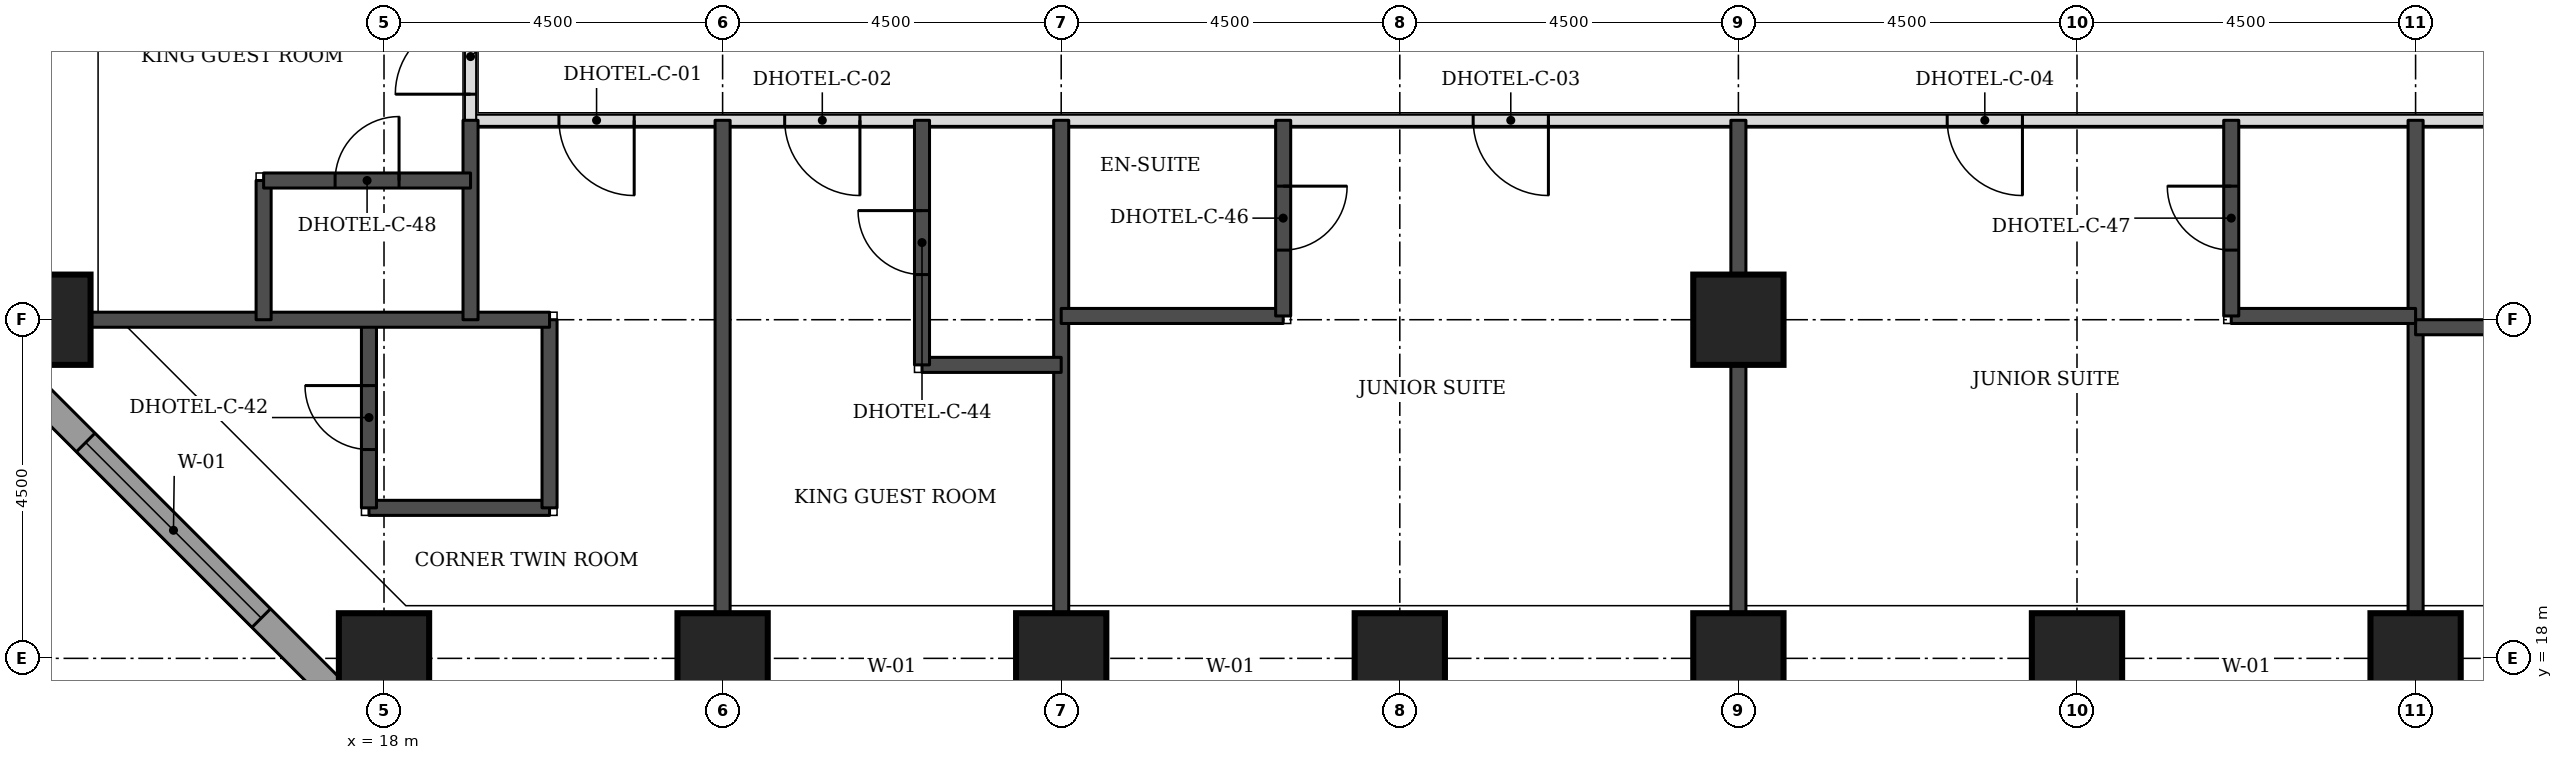
"""IFC4 building model, lengths in metres.
Left out: names, types, materials, properties, quantities, classifications, styles, units other than length and angle.
Written with IfcOpenShell. Run it as: python <this file> out.ifc"""

import sys

from ifc_helpers import new_model, si_unit, direction, frame, frame_2d, origin, origin_2d, place, context, subcontext, project, spatial, rectangle, extrude, element, fill, save


model = new_model("IFC4")
c1 = context("Model", 3, precision=1e-05, world=origin(), true_north=direction((0.0, 1.0)))
c2 = subcontext(c1, "Body", "Model", "MODEL_VIEW")
j1 = project(units=[si_unit("LENGTHUNIT", "METRE"), si_unit("PLANEANGLEUNIT", "RADIAN")], contexts=[c1])
p1 = place(None, origin())
s1 = spatial("IfcSite", under=j1, at=p1, CompositionType="ELEMENT")
p2 = place(p1, origin())
s2 = spatial("IfcBuilding", under=s1, at=p2, CompositionType="ELEMENT")
p3 = place(p2, frame((0.0, 0.0, 33.0)))
s3 = spatial("IfcBuildingStorey", under=s2, at=p3, CompositionType="ELEMENT", Elevation=33.0)
for number, where, z_axis, x_axis in (
    (1, (18.0, 18.0, 0.0), (0.0, 0.0, 1.0), (1.0, 0.0, 0.0)),
    (2, (22.5, 18.0, 0.0), (0.0, 0.0, 1.0), (1.0, 0.0, 0.0)),
    (3, (27.0, 18.0, 0.0), (0.0, 0.0, 1.0), (1.0, 0.0, 0.0)),
    (4, (31.5, 18.0, 0.0), (0.0, 0.0, 1.0), (1.0, 0.0, 0.0)),
    (5, (36.0, 18.0, 0.0), (0.0, 0.0, 1.0), (1.0, 0.0, 0.0)),
    (6, (40.5, 18.0, 0.0), (0.0, 0.0, 1.0), (1.0, 0.0, 0.0)),
    (7, (45.0, 18.0, 0.0), (0.0, 0.0, 1.0), (1.0, 0.0, 0.0)),
    (8, (13.5, 22.5, 0.0), (0.0, 0.0, 1.0), (1.0, 0.0, 0.0)),
    (9, (36.0, 22.5, 0.0), (0.0, 0.0, 1.0), (1.0, 0.0, 0.0)),
):
    element("IfcColumn", number, at=place(p3, frame(where, z_axis=z_axis, x_axis=x_axis)), inside=s3, PredefinedType="COLUMN", context=c2, shape_type="SweptSolid", body=[
        extrude(rectangle(XDim=1.2, YDim=1.2, at=origin_2d()), origin(), (0.0, 0.0, 1.0), 3.3),
    ])
p4 = place(p3, frame((12.674, 22.23, 0.0), z_axis=(0.0, 0.0, 1.0), x_axis=(0.707106781187, -0.707106781187, 0.0)))
e10 = element("IfcWall", 10, at=p4, inside=s3, PredefinedType="STANDARD", context=c2, shape_type="SweptSolid", body=[
    extrude(rectangle(XDim=7.151, YDim=0.35, at=frame_2d((3.576, 0.0))), origin(), (0.0, 0.0, 1.0), 3.055),
])
p5 = place(p4, frame((1.926, 0.0, 0.8)))
e11 = element("IfcOpeningElement", 11, at=p5, cuts=e10, PredefinedType="OPENING", context=c2, shape_type="SweptSolid", body=[
    extrude(rectangle(XDim=3.3, YDim=1.5, at=frame_2d((1.65, 0.75))), frame((0.0, 0.185, 0.0), z_axis=(0.0, -1.0, 0.0), x_axis=(1.0, 0.0, 0.0)), (0.0, 0.0, 1.0), 0.37),
])
p6 = place(p3, frame((19.15, 25.15, 0.0), z_axis=(0.0, 0.0, 1.0), x_axis=(1.0, 0.0, 0.0)))
e12 = element("IfcWall", 12, at=p6, inside=s3, PredefinedType="PARTITIONING", context=c2, shape_type="SweptSolid", body=[
    extrude(rectangle(XDim=33.7, YDim=0.15, at=frame_2d((16.85, 0.0))), origin(), (0.0, 0.0, 1.0), 3.08),
])
p7 = place(p6, frame((4.175, 0.0, 0.0)))
e13 = element("IfcOpeningElement", 13, at=p7, cuts=e12, PredefinedType="OPENING", context=c2, shape_type="SweptSolid", body=[
    extrude(rectangle(XDim=1.0, YDim=2.1, at=frame_2d((0.5, 1.05))), frame((0.0, 0.085, 0.0), z_axis=(0.0, -1.0, 0.0), x_axis=(1.0, 0.0, 0.0)), (0.0, 0.0, 1.0), 0.17),
])
p8 = place(p6, frame((13.325, 0.0, 0.0)))
e14 = element("IfcOpeningElement", 14, at=p8, cuts=e12, PredefinedType="OPENING", context=c2, shape_type="SweptSolid", body=[
    extrude(rectangle(XDim=1.0, YDim=2.1, at=frame_2d((0.5, 1.05))), frame((0.0, 0.085, 0.0), z_axis=(0.0, -1.0, 0.0), x_axis=(1.0, 0.0, 0.0)), (0.0, 0.0, 1.0), 0.17),
])
p9 = place(p6, frame((19.625, 0.0, 0.0)))
e15 = element("IfcOpeningElement", 15, at=p9, cuts=e12, PredefinedType="OPENING", context=c2, shape_type="SweptSolid", body=[
    extrude(rectangle(XDim=1.0, YDim=2.1, at=frame_2d((0.5, 1.05))), frame((0.0, 0.085, 0.0), z_axis=(0.0, -1.0, 0.0), x_axis=(1.0, 0.0, 0.0)), (0.0, 0.0, 1.0), 0.17),
])
p10 = place(p6, frame((28.775, 0.0, 0.0)))
e16 = element("IfcOpeningElement", 16, at=p10, cuts=e12, PredefinedType="OPENING", context=c2, shape_type="SweptSolid", body=[
    extrude(rectangle(XDim=1.0, YDim=2.1, at=frame_2d((0.5, 1.05))), frame((0.0, 0.085, 0.0), z_axis=(0.0, -1.0, 0.0), x_axis=(1.0, 0.0, 0.0)), (0.0, 0.0, 1.0), 0.17),
])
p11 = place(p6, frame((1.175, 0.0, 0.0)))
e17 = element("IfcOpeningElement", 17, at=p11, cuts=e12, PredefinedType="OPENING", context=c2, shape_type="SweptSolid", body=[
    extrude(rectangle(XDim=1.0, YDim=2.1, at=frame_2d((0.5, 1.05))), frame((0.0, 0.085, 0.0), z_axis=(0.0, -1.0, 0.0), x_axis=(1.0, 0.0, 0.0)), (0.0, 0.0, 1.0), 0.17),
])
p12 = place(p6, frame((31.525, 0.0, 0.0)))
e18 = element("IfcOpeningElement", 18, at=p12, cuts=e12, PredefinedType="OPENING", context=c2, shape_type="SweptSolid", body=[
    extrude(rectangle(XDim=1.0, YDim=2.1, at=frame_2d((0.5, 1.05))), frame((0.0, 0.085, 0.0), z_axis=(0.0, -1.0, 0.0), x_axis=(1.0, 0.0, 0.0)), (0.0, 0.0, 1.0), 0.17),
])
p13 = place(p3, frame((19.15, 25.15, 0.0), z_axis=(0.0, 0.0, 1.0), x_axis=(0.0, 1.0, 0.0)))
e19 = element("IfcWall", 19, at=p13, inside=s3, PredefinedType="PARTITIONING", context=c2, shape_type="SweptSolid", body=[
    extrude(rectangle(XDim=24.35, YDim=0.15, at=frame_2d((12.175, 0.0))), origin(), (0.0, 0.0, 1.0), 3.08),
])
p14 = place(p13, frame((0.347, 0.0, 0.0)))
e20 = element("IfcOpeningElement", 20, at=p14, cuts=e19, PredefinedType="OPENING", context=c2, shape_type="SweptSolid", body=[
    extrude(rectangle(XDim=1.0, YDim=2.1, at=frame_2d((0.5, 1.05))), frame((0.0, 0.085, 0.0), z_axis=(0.0, -1.0, 0.0), x_axis=(1.0, 0.0, 0.0)), (0.0, 0.0, 1.0), 0.17),
])
p15 = place(p13, frame((4.775, 0.0, 0.0)))
e21 = element("IfcOpeningElement", 21, at=p15, cuts=e19, PredefinedType="OPENING", context=c2, shape_type="SweptSolid", body=[
    extrude(rectangle(XDim=1.0, YDim=2.1, at=frame_2d((0.5, 1.05))), frame((0.0, 0.085, 0.0), z_axis=(0.0, -1.0, 0.0), x_axis=(1.0, 0.0, 0.0)), (0.0, 0.0, 1.0), 0.17),
])
p16 = place(p13, frame((7.175, 0.0, 0.0)))
e22 = element("IfcOpeningElement", 22, at=p16, cuts=e19, PredefinedType="OPENING", context=c2, shape_type="SweptSolid", body=[
    extrude(rectangle(XDim=1.0, YDim=2.1, at=frame_2d((0.5, 1.05))), frame((0.0, 0.085, 0.0), z_axis=(0.0, -1.0, 0.0), x_axis=(1.0, 0.0, 0.0)), (0.0, 0.0, 1.0), 0.17),
])
p17 = place(p13, frame((13.75, 0.0, 0.0)))
e23 = element("IfcOpeningElement", 23, at=p17, cuts=e19, PredefinedType="OPENING", context=c2, shape_type="SweptSolid", body=[
    extrude(rectangle(XDim=1.0, YDim=2.1, at=frame_2d((0.5, 1.05))), frame((0.0, 0.085, 0.0), z_axis=(0.0, -1.0, 0.0), x_axis=(1.0, 0.0, 0.0)), (0.0, 0.0, 1.0), 0.17),
])
p18 = place(p13, frame((16.175, 0.0, 0.0)))
e24 = element("IfcOpeningElement", 24, at=p18, cuts=e19, PredefinedType="OPENING", context=c2, shape_type="SweptSolid", body=[
    extrude(rectangle(XDim=1.0, YDim=2.1, at=frame_2d((0.5, 1.05))), frame((0.0, 0.085, 0.0), z_axis=(0.0, -1.0, 0.0), x_axis=(1.0, 0.0, 0.0)), (0.0, 0.0, 1.0), 0.17),
])
p19 = place(p13, frame((22.775, 0.0, 0.0)))
e25 = element("IfcOpeningElement", 25, at=p19, cuts=e19, PredefinedType="OPENING", context=c2, shape_type="SweptSolid", body=[
    extrude(rectangle(XDim=1.0, YDim=2.1, at=frame_2d((0.5, 1.05))), frame((0.0, 0.085, 0.0), z_axis=(0.0, -1.0, 0.0), x_axis=(1.0, 0.0, 0.0)), (0.0, 0.0, 1.0), 0.17),
])
for number, where, z_axis, x_axis in (
    (26, (22.5, 18.6, 0.0), (0.0, 0.0, 1.0), (0.0, 1.0, 0.0)),
    (27, (27.0, 18.6, 0.0), (0.0, 0.0, 1.0), (0.0, 1.0, 0.0)),
    (28, (36.0, 18.6, 0.0), (0.0, 0.0, 1.0), (0.0, 1.0, 0.0)),
    (29, (45.0, 18.6, 0.0), (0.0, 0.0, 1.0), (0.0, 1.0, 0.0)),
):
    element("IfcWall", number, at=place(p3, frame(where, z_axis=z_axis, x_axis=x_axis)), inside=s3, PredefinedType="SOLIDWALL", context=c2, shape_type="SweptSolid", body=[
        extrude(rectangle(XDim=6.55, YDim=0.2, at=frame_2d((3.275, 0.0))), origin(), (0.0, 0.0, 1.0), 3.08),
    ])
p20 = place(p3, frame((17.8, 20.0, 0.0), z_axis=(0.0, 0.0, 1.0), x_axis=(1.0, 0.0, 0.0)))
e30 = element("IfcWall", 30, at=p20, inside=s3, PredefinedType="SOLIDWALL", context=c2, shape_type="SweptSolid", body=[
    extrude(rectangle(XDim=2.4, YDim=0.2, at=frame_2d((1.2, 0.0))), origin(), (0.0, 0.0, 1.0), 3.08),
])
p21 = place(p3, frame((17.8, 20.0, 0.0), z_axis=(0.0, 0.0, 1.0), x_axis=(0.0, 1.0, 0.0)))
e31 = element("IfcWall", 31, at=p21, inside=s3, PredefinedType="SOLIDWALL", context=c2, shape_type="SweptSolid", body=[
    extrude(rectangle(XDim=2.5, YDim=0.2, at=frame_2d((1.25, 0.0))), origin(), (0.0, 0.0, 1.0), 3.08),
])
p22 = place(p21, frame((0.775, 0.0, 0.0)))
e32 = element("IfcOpeningElement", 32, at=p22, cuts=e31, PredefinedType="OPENING", context=c2, shape_type="SweptSolid", body=[
    extrude(rectangle(XDim=0.85, YDim=2.1, at=frame_2d((0.425, 1.05))), frame((0.0, 0.11, 0.0), z_axis=(0.0, -1.0, 0.0), x_axis=(1.0, 0.0, 0.0)), (0.0, 0.0, 1.0), 0.22),
])
p23 = place(p3, frame((20.2, 20.0, 0.0), z_axis=(0.0, 0.0, 1.0), x_axis=(0.0, 1.0, 0.0)))
e33 = element("IfcWall", 33, at=p23, inside=s3, PredefinedType="SOLIDWALL", context=c2, shape_type="SweptSolid", body=[
    extrude(rectangle(XDim=2.5, YDim=0.2, at=frame_2d((1.25, 0.0))), origin(), (0.0, 0.0, 1.0), 3.08),
])
p24 = place(p3, frame((25.15, 21.9, 0.0), z_axis=(0.0, 0.0, 1.0), x_axis=(1.0, 0.0, 0.0)))
e34 = element("IfcWall", 34, at=p24, inside=s3, PredefinedType="SOLIDWALL", context=c2, shape_type="SweptSolid", body=[
    extrude(rectangle(XDim=1.85, YDim=0.2, at=frame_2d((0.925, 0.0))), origin(), (0.0, 0.0, 1.0), 3.08),
])
p25 = place(p3, frame((25.15, 21.9, 0.0), z_axis=(0.0, 0.0, 1.0), x_axis=(0.0, 1.0, 0.0)))
e35 = element("IfcWall", 35, at=p25, inside=s3, PredefinedType="SOLIDWALL", context=c2, shape_type="SweptSolid", body=[
    extrude(rectangle(XDim=3.25, YDim=0.2, at=frame_2d((1.625, 0.0))), origin(), (0.0, 0.0, 1.0), 3.08),
])
p26 = place(p25, frame((1.2, 0.0, 0.0)))
e36 = element("IfcOpeningElement", 36, at=p26, cuts=e35, PredefinedType="OPENING", context=c2, shape_type="SweptSolid", body=[
    extrude(rectangle(XDim=0.85, YDim=2.1, at=frame_2d((0.425, 1.05))), frame((0.0, 0.11, 0.0), z_axis=(0.0, -1.0, 0.0), x_axis=(1.0, 0.0, 0.0)), (0.0, 0.0, 1.0), 0.22),
])
p27 = place(p3, frame((45.0, 22.4, 0.0), z_axis=(0.0, 0.0, 1.0), x_axis=(1.0, 0.0, 0.0)))
e37 = element("IfcWall", 37, at=p27, inside=s3, PredefinedType="SOLIDWALL", context=c2, shape_type="SweptSolid", body=[
    extrude(rectangle(XDim=2.35, YDim=0.2, at=frame_2d((1.175, 0.0))), origin(), (0.0, 0.0, 1.0), 3.08),
])
p28 = place(p3, frame((14.1, 22.5, 0.0), z_axis=(0.0, 0.0, 1.0), x_axis=(1.0, 0.0, 0.0)))
e38 = element("IfcWall", 38, at=p28, inside=s3, PredefinedType="SOLIDWALL", context=c2, shape_type="SweptSolid", body=[
    extrude(rectangle(XDim=6.1, YDim=0.2, at=frame_2d((3.05, 0.0))), origin(), (0.0, 0.0, 1.0), 3.08),
])
p29 = place(p3, frame((16.4, 22.5, 0.0), z_axis=(0.0, 0.0, 1.0), x_axis=(0.0, 1.0, 0.0)))
e39 = element("IfcWall", 39, at=p29, inside=s3, PredefinedType="SOLIDWALL", context=c2, shape_type="SweptSolid", body=[
    extrude(rectangle(XDim=1.85, YDim=0.2, at=frame_2d((0.925, 0.0))), origin(), (0.0, 0.0, 1.0), 3.08),
])
p30 = place(p3, frame((19.15, 22.5, 0.0), z_axis=(0.0, 0.0, 1.0), x_axis=(0.0, 1.0, 0.0)))
e40 = element("IfcWall", 40, at=p30, inside=s3, PredefinedType="SOLIDWALL", context=c2, shape_type="SweptSolid", body=[
    extrude(rectangle(XDim=2.65, YDim=0.2, at=frame_2d((1.325, 0.0))), origin(), (0.0, 0.0, 1.0), 3.08),
])
p31 = place(p3, frame((27.0, 22.55, 0.0), z_axis=(0.0, 0.0, 1.0), x_axis=(1.0, 0.0, 0.0)))
e41 = element("IfcWall", 41, at=p31, inside=s3, PredefinedType="SOLIDWALL", context=c2, shape_type="SweptSolid", body=[
    extrude(rectangle(XDim=2.95, YDim=0.2, at=frame_2d((1.475, 0.0))), origin(), (0.0, 0.0, 1.0), 3.08),
])
p32 = place(p3, frame((29.95, 22.55, 0.0), z_axis=(0.0, 0.0, 1.0), x_axis=(0.0, 1.0, 0.0)))
e42 = element("IfcWall", 42, at=p32, inside=s3, PredefinedType="SOLIDWALL", context=c2, shape_type="SweptSolid", body=[
    extrude(rectangle(XDim=2.6, YDim=0.2, at=frame_2d((1.3, 0.0))), origin(), (0.0, 0.0, 1.0), 3.08),
])
p33 = place(p32, frame((0.875, 0.0, 0.0)))
e43 = element("IfcOpeningElement", 43, at=p33, cuts=e42, PredefinedType="OPENING", context=c2, shape_type="SweptSolid", body=[
    extrude(rectangle(XDim=0.85, YDim=2.1, at=frame_2d((0.425, 1.05))), frame((0.0, 0.11, 0.0), z_axis=(0.0, -1.0, 0.0), x_axis=(1.0, 0.0, 0.0)), (0.0, 0.0, 1.0), 0.22),
])
p34 = place(p3, frame((42.55, 22.55, 0.0), z_axis=(0.0, 0.0, 1.0), x_axis=(1.0, 0.0, 0.0)))
e44 = element("IfcWall", 44, at=p34, inside=s3, PredefinedType="SOLIDWALL", context=c2, shape_type="SweptSolid", body=[
    extrude(rectangle(XDim=2.45, YDim=0.2, at=frame_2d((1.225, 0.0))), origin(), (0.0, 0.0, 1.0), 3.08),
])
p35 = place(p3, frame((42.55, 22.55, 0.0), z_axis=(0.0, 0.0, 1.0), x_axis=(0.0, 1.0, 0.0)))
e45 = element("IfcWall", 45, at=p35, inside=s3, PredefinedType="SOLIDWALL", context=c2, shape_type="SweptSolid", body=[
    extrude(rectangle(XDim=2.6, YDim=0.2, at=frame_2d((1.3, 0.0))), origin(), (0.0, 0.0, 1.0), 3.08),
])
p36 = place(p35, frame((0.875, 0.0, 0.0)))
e46 = element("IfcOpeningElement", 46, at=p36, cuts=e45, PredefinedType="OPENING", context=c2, shape_type="SweptSolid", body=[
    extrude(rectangle(XDim=0.85, YDim=2.1, at=frame_2d((0.425, 1.05))), frame((0.0, 0.11, 0.0), z_axis=(0.0, -1.0, 0.0), x_axis=(1.0, 0.0, 0.0)), (0.0, 0.0, 1.0), 0.22),
])
p37 = place(p3, frame((16.4, 24.35, 0.0), z_axis=(0.0, 0.0, 1.0), x_axis=(1.0, 0.0, 0.0)))
e47 = element("IfcWall", 47, at=p37, inside=s3, PredefinedType="SOLIDWALL", context=c2, shape_type="SweptSolid", body=[
    extrude(rectangle(XDim=2.75, YDim=0.2, at=frame_2d((1.375, 0.0))), origin(), (0.0, 0.0, 1.0), 3.08),
])
p38 = place(p37, frame((0.95, 0.0, 0.0)))
e48 = element("IfcOpeningElement", 48, at=p38, cuts=e47, PredefinedType="OPENING", context=c2, shape_type="SweptSolid", body=[
    extrude(rectangle(XDim=0.85, YDim=2.1, at=frame_2d((0.425, 1.05))), frame((0.0, 0.11, 0.0), z_axis=(0.0, -1.0, 0.0), x_axis=(1.0, 0.0, 0.0)), (0.0, 0.0, 1.0), 0.22),
])
p39 = place(p5, origin())
e49 = element("IfcWindow", 49, at=p39, inside=s3, PartitioningType="SINGLE_PANEL", PredefinedType="WINDOW", context=c2, shape_type="SweptSolid", body=[
    extrude(rectangle(XDim=3.3, YDim=1.5, at=frame_2d((1.65, 0.75))), frame((0.0, 0.085, 0.0), z_axis=(0.0, -1.0, 0.0), x_axis=(1.0, 0.0, 0.0)), (0.0, 0.0, 1.0), 0.06),
])
fill(e11, e49)
p40 = place(p7, frame((1.0, 0.0, 0.0), z_axis=(0.0, 0.0, 1.0), x_axis=(-1.0, 0.0, 0.0)))
e50 = element("IfcDoor", 50, at=p40, inside=s3, OperationType="SINGLE_SWING_LEFT", PredefinedType="DOOR", context=c2, shape_type="SweptSolid", body=[
    extrude(rectangle(XDim=1.0, YDim=2.1, at=frame_2d((0.5, 1.05))), frame((0.0, 0.025, 0.0), z_axis=(0.0, -1.0, 0.0), x_axis=(1.0, 0.0, 0.0)), (0.0, 0.0, 1.0), 0.05),
])
fill(e13, e50)
p41 = place(p26, origin())
e51 = element("IfcDoor", 51, at=p41, inside=s3, OperationType="SINGLE_SWING_RIGHT", PredefinedType="DOOR", context=c2, shape_type="SweptSolid", body=[
    extrude(rectangle(XDim=0.85, YDim=2.1, at=frame_2d((0.425, 1.05))), frame((0.0, 0.025, 0.0), z_axis=(0.0, -1.0, 0.0), x_axis=(1.0, 0.0, 0.0)), (0.0, 0.0, 1.0), 0.05),
])
fill(e36, e51)
p42 = place(p8, frame((1.0, 0.0, 0.0), z_axis=(0.0, 0.0, 1.0), x_axis=(-1.0, 0.0, 0.0)))
e52 = element("IfcDoor", 52, at=p42, inside=s3, OperationType="SINGLE_SWING_LEFT", PredefinedType="DOOR", context=c2, shape_type="SweptSolid", body=[
    extrude(rectangle(XDim=1.0, YDim=2.1, at=frame_2d((0.5, 1.05))), frame((0.0, 0.025, 0.0), z_axis=(0.0, -1.0, 0.0), x_axis=(1.0, 0.0, 0.0)), (0.0, 0.0, 1.0), 0.05),
])
fill(e14, e52)
p43 = place(p33, frame((0.85, 0.0, 0.0), z_axis=(0.0, 0.0, 1.0), x_axis=(-1.0, 0.0, 0.0)))
e53 = element("IfcDoor", 53, at=p43, inside=s3, OperationType="SINGLE_SWING_LEFT", PredefinedType="DOOR", context=c2, shape_type="SweptSolid", body=[
    extrude(rectangle(XDim=0.85, YDim=2.1, at=frame_2d((0.425, 1.05))), frame((0.0, 0.025, 0.0), z_axis=(0.0, -1.0, 0.0), x_axis=(1.0, 0.0, 0.0)), (0.0, 0.0, 1.0), 0.05),
])
fill(e43, e53)
p44 = place(p9, frame((1.0, 0.0, 0.0), z_axis=(0.0, 0.0, 1.0), x_axis=(-1.0, 0.0, 0.0)))
e54 = element("IfcDoor", 54, at=p44, inside=s3, OperationType="SINGLE_SWING_LEFT", PredefinedType="DOOR", context=c2, shape_type="SweptSolid", body=[
    extrude(rectangle(XDim=1.0, YDim=2.1, at=frame_2d((0.5, 1.05))), frame((0.0, 0.025, 0.0), z_axis=(0.0, -1.0, 0.0), x_axis=(1.0, 0.0, 0.0)), (0.0, 0.0, 1.0), 0.05),
])
fill(e15, e54)
p45 = place(p36, origin())
e55 = element("IfcDoor", 55, at=p45, inside=s3, OperationType="SINGLE_SWING_RIGHT", PredefinedType="DOOR", context=c2, shape_type="SweptSolid", body=[
    extrude(rectangle(XDim=0.85, YDim=2.1, at=frame_2d((0.425, 1.05))), frame((0.0, 0.025, 0.0), z_axis=(0.0, -1.0, 0.0), x_axis=(1.0, 0.0, 0.0)), (0.0, 0.0, 1.0), 0.05),
])
fill(e46, e55)
p46 = place(p14, origin())
e56 = element("IfcDoor", 56, at=p46, inside=s3, OperationType="SINGLE_SWING_LEFT", PredefinedType="DOOR", context=c2, shape_type="SweptSolid", body=[
    extrude(rectangle(XDim=1.0, YDim=2.1, at=frame_2d((0.5, 1.05))), frame((0.0, 0.025, 0.0), z_axis=(0.0, -1.0, 0.0), x_axis=(1.0, 0.0, 0.0)), (0.0, 0.0, 1.0), 0.05),
])
fill(e20, e56)
p47 = place(p38, origin())
e57 = element("IfcDoor", 57, at=p47, inside=s3, OperationType="SINGLE_SWING_RIGHT", PredefinedType="DOOR", context=c2, shape_type="SweptSolid", body=[
    extrude(rectangle(XDim=0.85, YDim=2.1, at=frame_2d((0.425, 1.05))), frame((0.0, 0.025, 0.0), z_axis=(0.0, -1.0, 0.0), x_axis=(1.0, 0.0, 0.0)), (0.0, 0.0, 1.0), 0.05),
])
fill(e48, e57)
p48 = place(p11, frame((1.0, 0.0, 0.0), z_axis=(0.0, 0.0, 1.0), x_axis=(-1.0, 0.0, 0.0)))
e58 = element("IfcDoor", 58, at=p48, inside=s3, OperationType="SINGLE_SWING_LEFT", PredefinedType="DOOR", context=c2, shape_type="SweptSolid", body=[
    extrude(rectangle(XDim=1.0, YDim=2.1, at=frame_2d((0.5, 1.05))), frame((0.0, 0.025, 0.0), z_axis=(0.0, -1.0, 0.0), x_axis=(1.0, 0.0, 0.0)), (0.0, 0.0, 1.0), 0.05),
])
fill(e17, e58)
p49 = place(p22, origin())
e59 = element("IfcDoor", 59, at=p49, inside=s3, OperationType="SINGLE_SWING_RIGHT", PredefinedType="DOOR", context=c2, shape_type="SweptSolid", body=[
    extrude(rectangle(XDim=0.85, YDim=2.1, at=frame_2d((0.425, 1.05))), frame((0.0, 0.025, 0.0), z_axis=(0.0, -1.0, 0.0), x_axis=(1.0, 0.0, 0.0)), (0.0, 0.0, 1.0), 0.05),
])
fill(e32, e59)
save(model, sys.argv[1])
